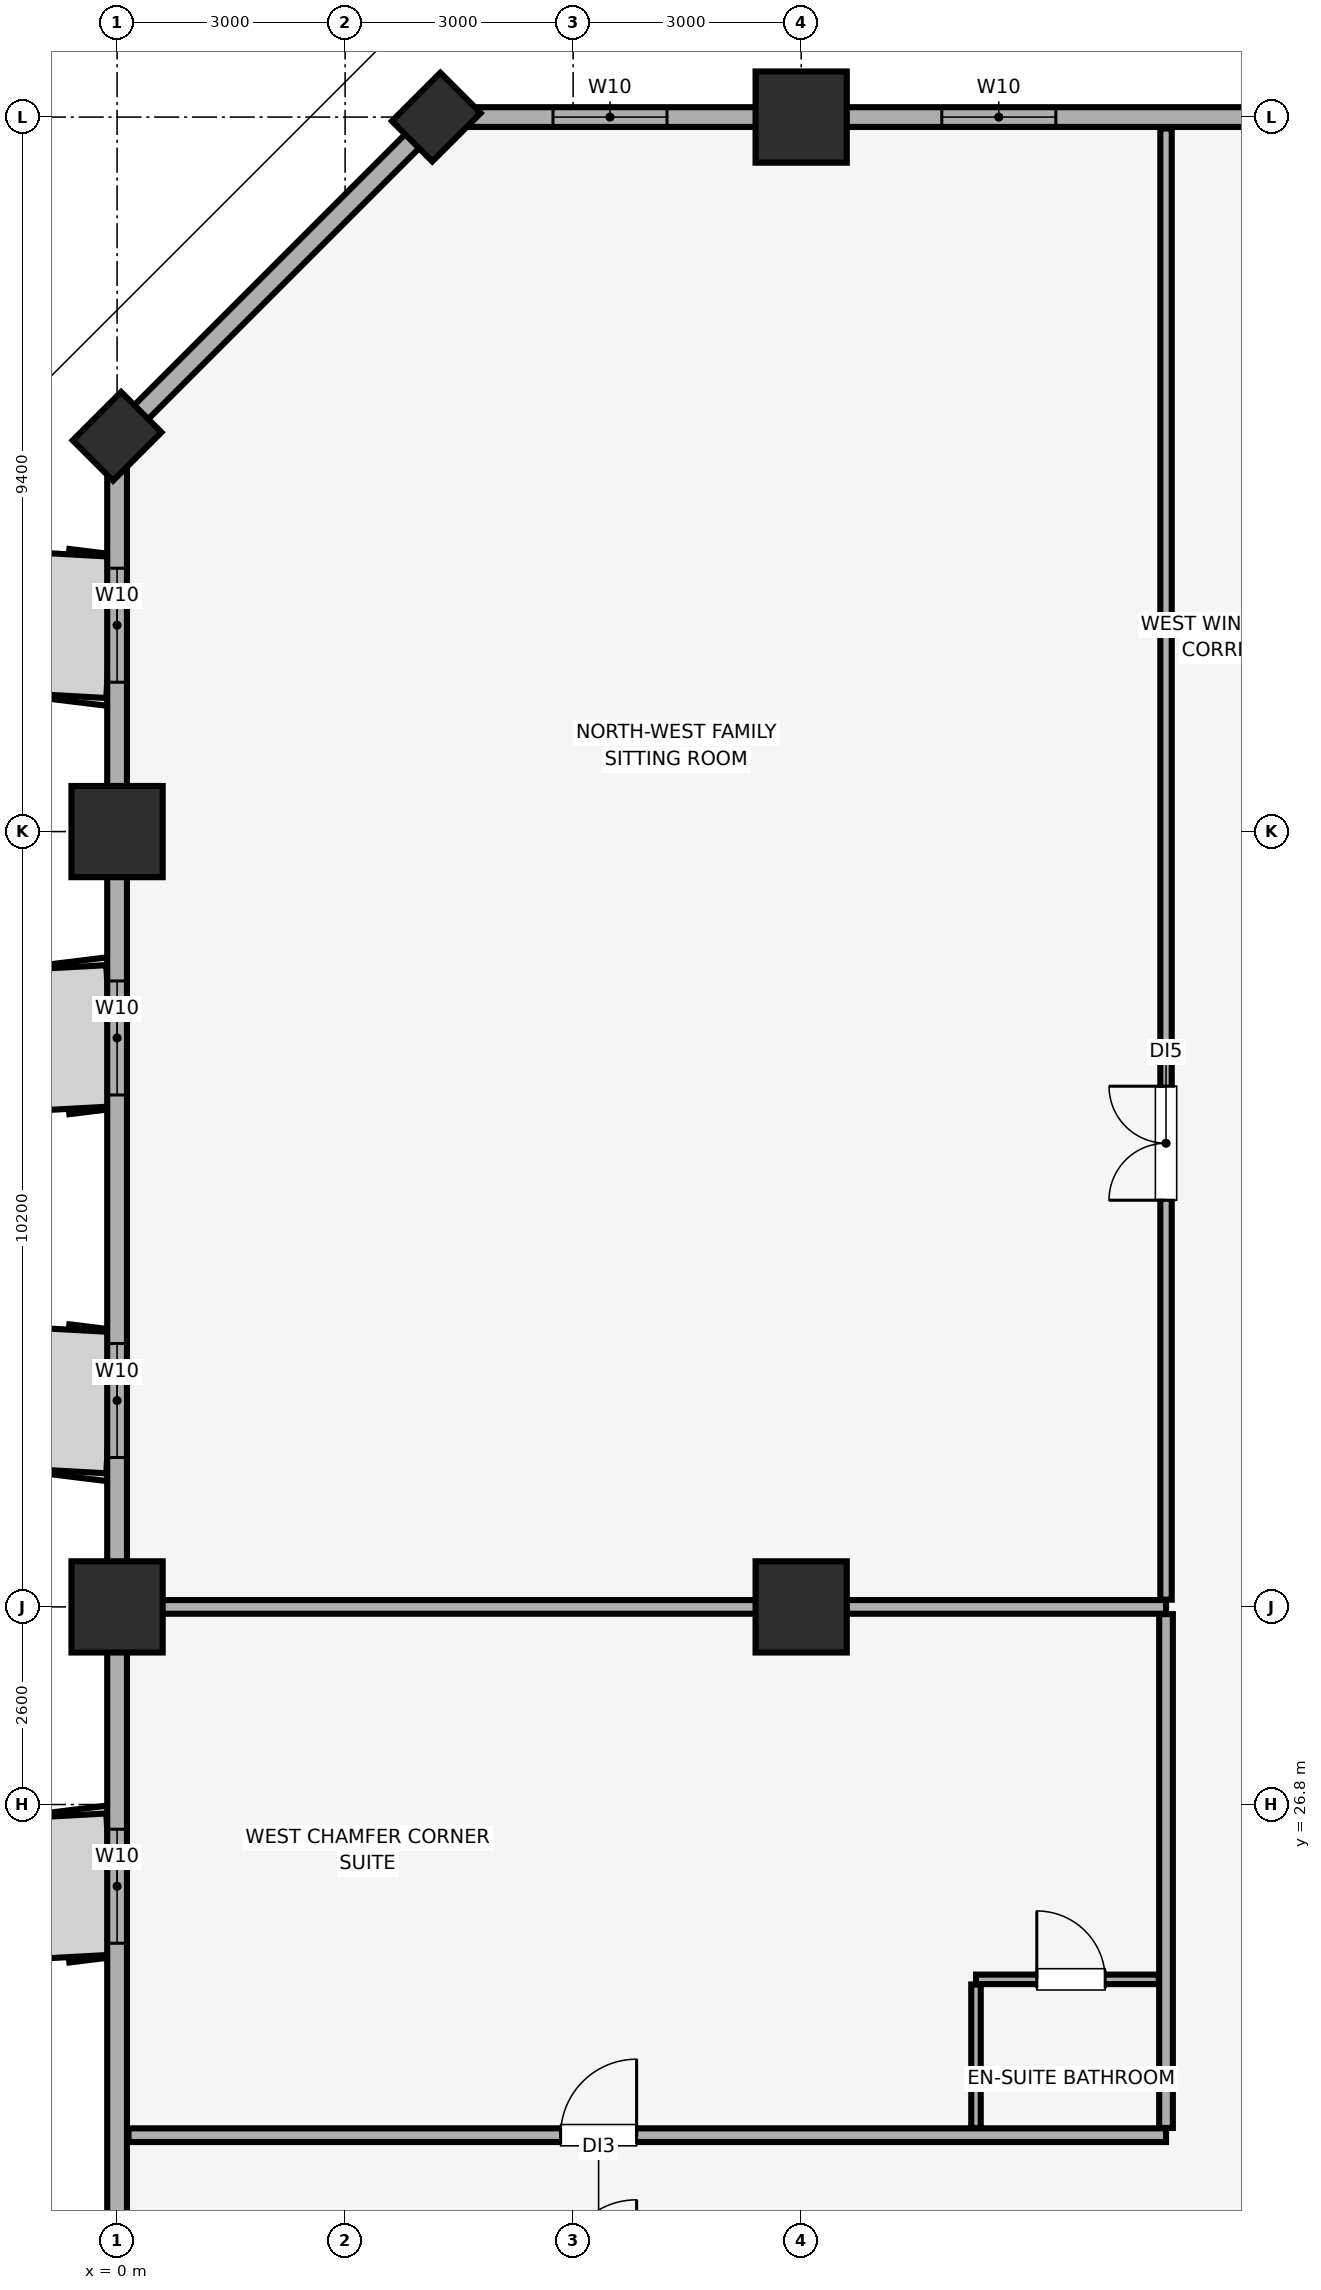
"""IFC4 building model, lengths in metres.
Left out: names, types, materials, properties, quantities, classifications, styles, units other than length and angle.
Written with IfcOpenShell. Run it as: python <this file> out.ifc"""

import sys

from ifc_helpers import new_model, si_unit, direction, frame, frame_2d, origin, origin_2d, place, context, subcontext, project, spatial, rectangle, extrude, element, fill, save


model = new_model("IFC4")
c1 = context("Model", 3, precision=1e-05, world=origin(), true_north=direction((0.0, 1.0)))
c2 = subcontext(c1, "Body", "Model", "MODEL_VIEW")
j1 = project(units=[si_unit("LENGTHUNIT", "METRE"), si_unit("PLANEANGLEUNIT", "RADIAN")], contexts=[c1])
p1 = place(None, origin())
s1 = spatial("IfcSite", under=j1, at=p1, CompositionType="ELEMENT")
p2 = place(p1, origin())
s2 = spatial("IfcBuilding", under=s1, at=p2, CompositionType="ELEMENT")
p3 = place(p2, frame((0.0, 0.0, 93.05)))
s3 = spatial("IfcBuildingStorey", under=s2, at=p3, CompositionType="ELEMENT", Elevation=93.05)
for number, where, z_axis, x_axis in (
    (1, (0.0, 29.4, 0.0), (0.0, 0.0, 1.0), (1.0, 0.0, 0.0)),
    (2, (0.0, 39.6, 0.0), (0.0, 0.0, 1.0), (1.0, 0.0, 0.0)),
):
    element("IfcColumn", number, at=place(p3, frame(where, z_axis=z_axis, x_axis=x_axis)), inside=s3, PredefinedType="COLUMN", context=c2, shape_type="SweptSolid", body=[
        extrude(rectangle(XDim=1.2, YDim=1.2, at=origin_2d()), origin(), (0.0, 0.0, 1.0), 3.51),
    ])
for number, where, z_axis, x_axis in (
    (3, (4.2, 49.0, 0.0), (0.0, 0.0, 1.0), (0.707, 0.707, 0.0)),
    (4, (0.0, 44.8, 0.0), (0.0, 0.0, 1.0), (0.707, 0.707, 0.0)),
):
    element("IfcColumn", number, at=place(p3, frame(where, z_axis=z_axis, x_axis=x_axis)), inside=s3, PredefinedType="PILASTER", context=c2, shape_type="SweptSolid", body=[
        extrude(rectangle(XDim=0.9, YDim=0.75, at=origin_2d()), origin(), (0.0, 0.0, 1.0), 3.51),
    ])
for number, where, z_axis, x_axis in (
    (5, (9.0, 29.4, 0.0), (0.0, 0.0, 1.0), (1.0, 0.0, 0.0)),
    (6, (9.0, 49.0, 0.0), (0.0, 0.0, 1.0), (1.0, 0.0, 0.0)),
):
    element("IfcColumn", number, at=place(p3, frame(where, z_axis=z_axis, x_axis=x_axis)), inside=s3, PredefinedType="COLUMN", context=c2, shape_type="SweptSolid", body=[
        extrude(rectangle(XDim=1.2, YDim=1.2, at=origin_2d()), origin(), (0.0, 0.0, 1.0), 3.51),
    ])
p4 = place(p3, frame((79.8, 49.0, 0.0), z_axis=(0.0, 0.0, 1.0), x_axis=(-1.0, 0.0, 0.0)))
e7 = element("IfcWall", 7, at=p4, inside=s3, PredefinedType="SOLIDWALL", context=c2, shape_type="SweptSolid", body=[
    extrude(rectangle(XDim=75.6, YDim=0.26, at=frame_2d((37.8, 0.0))), origin(), (0.0, 0.0, 1.0), 2.56),
])
p5 = place(p4, frame((72.565, 0.0, 0.85)))
e8 = element("IfcOpeningElement", 8, at=p5, cuts=e7, PredefinedType="OPENING", context=c2, shape_type="SweptSolid", body=[
    extrude(rectangle(XDim=1.5, YDim=1.4, at=frame_2d((0.75, 0.7))), frame((0.0, 0.14, 0.0), z_axis=(0.0, -1.0, 0.0), x_axis=(1.0, 0.0, 0.0)), (0.0, 0.0, 1.0), 0.28),
])
p6 = place(p4, frame((67.45, 0.0, 0.85)))
e9 = element("IfcOpeningElement", 9, at=p6, cuts=e7, PredefinedType="OPENING", context=c2, shape_type="SweptSolid", body=[
    extrude(rectangle(XDim=1.5, YDim=1.4, at=frame_2d((0.75, 0.7))), frame((0.0, 0.14, 0.0), z_axis=(0.0, -1.0, 0.0), x_axis=(1.0, 0.0, 0.0)), (0.0, 0.0, 1.0), 0.28),
])
p7 = place(p4, frame((7.6, 0.0, 0.85)))
e10 = element("IfcOpeningElement", 10, at=p7, cuts=e7, PredefinedType="OPENING", context=c2, shape_type="SweptSolid", body=[
    extrude(rectangle(XDim=1.5, YDim=1.4, at=frame_2d((0.75, 0.7))), frame((0.0, 0.14, 0.0), z_axis=(0.0, -1.0, 0.0), x_axis=(1.0, 0.0, 0.0)), (0.0, 0.0, 1.0), 0.28),
])
p8 = place(p4, frame((1.535, 0.0, 0.85)))
e11 = element("IfcOpeningElement", 11, at=p8, cuts=e7, PredefinedType="OPENING", context=c2, shape_type="SweptSolid", body=[
    extrude(rectangle(XDim=1.5, YDim=1.4, at=frame_2d((0.75, 0.7))), frame((0.0, 0.14, 0.0), z_axis=(0.0, -1.0, 0.0), x_axis=(1.0, 0.0, 0.0)), (0.0, 0.0, 1.0), 0.28),
])
p9 = place(p4, frame((52.265, 0.0, 0.9)))
e12 = element("IfcOpeningElement", 12, at=p9, cuts=e7, PredefinedType="OPENING", context=c2, shape_type="SweptSolid", body=[
    extrude(rectangle(XDim=1.5, YDim=1.4, at=frame_2d((0.75, 0.7))), frame((0.0, 0.14, 0.0), z_axis=(0.0, -1.0, 0.0), x_axis=(1.0, 0.0, 0.0)), (0.0, 0.0, 1.0), 0.28),
])
p10 = place(p4, frame((45.5, 0.0, 0.9)))
e13 = element("IfcOpeningElement", 13, at=p10, cuts=e7, PredefinedType="OPENING", context=c2, shape_type="SweptSolid", body=[
    extrude(rectangle(XDim=1.5, YDim=1.4, at=frame_2d((0.75, 0.7))), frame((0.0, 0.14, 0.0), z_axis=(0.0, -1.0, 0.0), x_axis=(1.0, 0.0, 0.0)), (0.0, 0.0, 1.0), 0.28),
])
p11 = place(p4, frame((31.05, 0.0, 0.9)))
e14 = element("IfcOpeningElement", 14, at=p11, cuts=e7, PredefinedType="OPENING", context=c2, shape_type="SweptSolid", body=[
    extrude(rectangle(XDim=1.5, YDim=1.4, at=frame_2d((0.75, 0.7))), frame((0.0, 0.14, 0.0), z_axis=(0.0, -1.0, 0.0), x_axis=(1.0, 0.0, 0.0)), (0.0, 0.0, 1.0), 0.28),
])
p12 = place(p4, frame((27.85, 0.0, 0.9)))
e15 = element("IfcOpeningElement", 15, at=p12, cuts=e7, PredefinedType="OPENING", context=c2, shape_type="SweptSolid", body=[
    extrude(rectangle(XDim=1.5, YDim=1.4, at=frame_2d((0.75, 0.7))), frame((0.0, 0.14, 0.0), z_axis=(0.0, -1.0, 0.0), x_axis=(1.0, 0.0, 0.0)), (0.0, 0.0, 1.0), 0.28),
])
p13 = place(p4, frame((23.485, 0.0, 0.9)))
e16 = element("IfcOpeningElement", 16, at=p13, cuts=e7, PredefinedType="OPENING", context=c2, shape_type="SweptSolid", body=[
    extrude(rectangle(XDim=1.5, YDim=1.4, at=frame_2d((0.75, 0.7))), frame((0.0, 0.14, 0.0), z_axis=(0.0, -1.0, 0.0), x_axis=(1.0, 0.0, 0.0)), (0.0, 0.0, 1.0), 0.28),
])
p14 = place(p3, frame((4.2, 49.0, 0.0), z_axis=(0.0, 0.0, 1.0), x_axis=(-0.707106781187, -0.707106781187, 0.0)))
e17 = element("IfcWall", 17, at=p14, inside=s3, PredefinedType="SOLIDWALL", context=c2, shape_type="SweptSolid", body=[
    extrude(rectangle(XDim=5.94, YDim=0.26, at=frame_2d((2.97, 0.0))), origin(), (0.0, 0.0, 1.0), 2.56),
])
p15 = place(p3, frame((0.0, 44.8, 0.0), z_axis=(0.0, 0.0, 1.0), x_axis=(0.0, -1.0, 0.0)))
e18 = element("IfcWall", 18, at=p15, inside=s3, PredefinedType="SOLIDWALL", context=c2, shape_type="SweptSolid", body=[
    extrude(rectangle(XDim=40.6, YDim=0.26, at=frame_2d((20.3, 0.0))), origin(), (0.0, 0.0, 1.0), 2.56),
])
p16 = place(p15, frame((33.05, 0.0, 0.85)))
e19 = element("IfcOpeningElement", 19, at=p16, cuts=e18, PredefinedType="OPENING", context=c2, shape_type="SweptSolid", body=[
    extrude(rectangle(XDim=1.5, YDim=1.4, at=frame_2d((0.75, 0.7))), frame((0.0, 0.14, 0.0), z_axis=(0.0, -1.0, 0.0), x_axis=(1.0, 0.0, 0.0)), (0.0, 0.0, 1.0), 0.28),
])
p17 = place(p15, frame((26.05, 0.0, 0.85)))
e20 = element("IfcOpeningElement", 20, at=p17, cuts=e18, PredefinedType="OPENING", context=c2, shape_type="SweptSolid", body=[
    extrude(rectangle(XDim=1.5, YDim=1.4, at=frame_2d((0.75, 0.7))), frame((0.0, 0.14, 0.0), z_axis=(0.0, -1.0, 0.0), x_axis=(1.0, 0.0, 0.0)), (0.0, 0.0, 1.0), 0.28),
])
p18 = place(p15, frame((18.325, 0.0, 0.85)))
e21 = element("IfcOpeningElement", 21, at=p18, cuts=e18, PredefinedType="OPENING", context=c2, shape_type="SweptSolid", body=[
    extrude(rectangle(XDim=1.5, YDim=1.4, at=frame_2d((0.75, 0.7))), frame((0.0, 0.14, 0.0), z_axis=(0.0, -1.0, 0.0), x_axis=(1.0, 0.0, 0.0)), (0.0, 0.0, 1.0), 0.28),
])
p19 = place(p15, frame((11.935, 0.0, 0.85)))
e22 = element("IfcOpeningElement", 22, at=p19, cuts=e18, PredefinedType="OPENING", context=c2, shape_type="SweptSolid", body=[
    extrude(rectangle(XDim=1.5, YDim=1.4, at=frame_2d((0.75, 0.7))), frame((0.0, 0.14, 0.0), z_axis=(0.0, -1.0, 0.0), x_axis=(1.0, 0.0, 0.0)), (0.0, 0.0, 1.0), 0.28),
])
p20 = place(p15, frame((7.165, 0.0, 0.85)))
e23 = element("IfcOpeningElement", 23, at=p20, cuts=e18, PredefinedType="OPENING", context=c2, shape_type="SweptSolid", body=[
    extrude(rectangle(XDim=1.5, YDim=1.4, at=frame_2d((0.75, 0.7))), frame((0.0, 0.14, 0.0), z_axis=(0.0, -1.0, 0.0), x_axis=(1.0, 0.0, 0.0)), (0.0, 0.0, 1.0), 0.28),
])
p21 = place(p15, frame((1.735, 0.0, 0.85)))
e24 = element("IfcOpeningElement", 24, at=p21, cuts=e18, PredefinedType="OPENING", context=c2, shape_type="SweptSolid", body=[
    extrude(rectangle(XDim=1.5, YDim=1.4, at=frame_2d((0.75, 0.7))), frame((0.0, 0.14, 0.0), z_axis=(0.0, -1.0, 0.0), x_axis=(1.0, 0.0, 0.0)), (0.0, 0.0, 1.0), 0.28),
])
p22 = place(p3, frame((0.15, 22.45, 0.0), z_axis=(0.0, 0.0, 1.0), x_axis=(1.0, 0.0, 0.0)))
e25 = element("IfcWall", 25, at=p22, inside=s3, PredefinedType="PARTITIONING", context=c2, shape_type="SweptSolid", body=[
    extrude(rectangle(XDim=13.65, YDim=0.18, at=frame_2d((6.825, 0.0))), origin(), (0.0, 0.0, 1.0), 3.51),
])
p23 = place(p22, frame((5.685, 0.0, 0.0)))
e26 = element("IfcOpeningElement", 26, at=p23, cuts=e25, PredefinedType="OPENING", context=c2, shape_type="SweptSolid", body=[
    extrude(rectangle(XDim=1.0, YDim=2.15, at=frame_2d((0.5, 1.075))), frame((0.0, 0.1, 0.0), z_axis=(0.0, -1.0, 0.0), x_axis=(1.0, 0.0, 0.0)), (0.0, 0.0, 1.0), 0.2),
])
p24 = place(p3, frame((0.15, 29.4, 0.0), z_axis=(0.0, 0.0, 1.0), x_axis=(1.0, 0.0, 0.0)))
e27 = element("IfcWall", 27, at=p24, inside=s3, PredefinedType="PARTITIONING", context=c2, shape_type="SweptSolid", body=[
    extrude(rectangle(XDim=13.65, YDim=0.18, at=frame_2d((6.825, 0.0))), origin(), (0.0, 0.0, 1.0), 2.86),
])
p25 = place(p3, frame((13.8, 22.545, 0.0), z_axis=(0.0, 0.0, 1.0), x_axis=(0.0, 1.0, 0.0)))
e28 = element("IfcWall", 28, at=p25, inside=s3, PredefinedType="PARTITIONING", context=c2, shape_type="SweptSolid", body=[
    extrude(rectangle(XDim=6.76, YDim=0.18, at=frame_2d((3.38, 0.0))), origin(), (0.0, 0.0, 1.0), 3.51),
])
p26 = place(p3, frame((11.3, 24.5, 0.0), z_axis=(0.0, 0.0, 1.0), x_axis=(1.0, 0.0, 0.0)))
e29 = element("IfcWall", 29, at=p26, inside=s3, PredefinedType="PARTITIONING", context=c2, shape_type="SweptSolid", body=[
    extrude(rectangle(XDim=2.405, YDim=0.125, at=frame_2d((1.203, 0.0))), origin(), (0.0, 0.0, 1.0), 3.51),
])
p27 = place(p26, frame((0.8, 0.0, 0.0)))
e30 = element("IfcOpeningElement", 30, at=p27, cuts=e29, PredefinedType="OPENING", context=c2, shape_type="SweptSolid", body=[
    extrude(rectangle(XDim=0.9, YDim=2.1, at=frame_2d((0.45, 1.05))), frame((0.0, 0.073, 0.0), z_axis=(0.0, -1.0, 0.0), x_axis=(1.0, 0.0, 0.0)), (0.0, 0.0, 1.0), 0.145),
])
p28 = place(p3, frame((11.3, 22.545, 0.0), z_axis=(0.0, 0.0, 1.0), x_axis=(0.0, 1.0, 0.0)))
e31 = element("IfcWall", 31, at=p28, inside=s3, PredefinedType="PARTITIONING", context=c2, shape_type="SweptSolid", body=[
    extrude(rectangle(XDim=1.888, YDim=0.125, at=frame_2d((0.944, 0.0))), origin(), (0.0, 0.0, 1.0), 3.51),
])
p29 = place(p3, frame((13.8, 29.495, 0.0), z_axis=(0.0, 0.0, 1.0), x_axis=(0.0, 1.0, 0.0)))
e32 = element("IfcWall", 32, at=p29, inside=s3, PredefinedType="PARTITIONING", context=c2, shape_type="SweptSolid", body=[
    extrude(rectangle(XDim=19.355, YDim=0.15, at=frame_2d((9.677, 0.0))), origin(), (0.0, 0.0, 1.0), 3.51),
])
p30 = place(p29, frame((5.255, 0.0, 0.0)))
e33 = element("IfcOpeningElement", 33, at=p30, cuts=e32, PredefinedType="OPENING", context=c2, shape_type="SweptSolid", body=[
    extrude(rectangle(XDim=1.5, YDim=2.25, at=frame_2d((0.75, 1.125))), frame((0.0, 0.085, 0.0), z_axis=(0.0, -1.0, 0.0), x_axis=(1.0, 0.0, 0.0)), (0.0, 0.0, 1.0), 0.17),
])
p31 = place(p18, origin())
e34 = element("IfcWindow", 34, at=p31, inside=s3, PartitioningType="SINGLE_PANEL", PredefinedType="WINDOW", context=c2, shape_type="SweptSolid", body=[
    extrude(rectangle(XDim=1.5, YDim=1.4, at=frame_2d((0.75, 0.7))), frame((0.0, 0.03, 0.0), z_axis=(0.0, -1.0, 0.0), x_axis=(1.0, 0.0, 0.0)), (0.0, 0.0, 1.0), 0.06),
])
fill(e21, e34)
p32 = place(p19, origin())
e35 = element("IfcWindow", 35, at=p32, inside=s3, PartitioningType="SINGLE_PANEL", PredefinedType="WINDOW", context=c2, shape_type="SweptSolid", body=[
    extrude(rectangle(XDim=1.5, YDim=1.4, at=frame_2d((0.75, 0.7))), frame((0.0, 0.03, 0.0), z_axis=(0.0, -1.0, 0.0), x_axis=(1.0, 0.0, 0.0)), (0.0, 0.0, 1.0), 0.06),
])
fill(e22, e35)
p33 = place(p20, origin())
e36 = element("IfcWindow", 36, at=p33, inside=s3, PartitioningType="SINGLE_PANEL", PredefinedType="WINDOW", context=c2, shape_type="SweptSolid", body=[
    extrude(rectangle(XDim=1.5, YDim=1.4, at=frame_2d((0.75, 0.7))), frame((0.0, 0.03, 0.0), z_axis=(0.0, -1.0, 0.0), x_axis=(1.0, 0.0, 0.0)), (0.0, 0.0, 1.0), 0.06),
])
fill(e23, e36)
p34 = place(p21, origin())
e37 = element("IfcWindow", 37, at=p34, inside=s3, PartitioningType="SINGLE_PANEL", PredefinedType="WINDOW", context=c2, shape_type="SweptSolid", body=[
    extrude(rectangle(XDim=1.5, YDim=1.4, at=frame_2d((0.75, 0.7))), frame((0.0, 0.03, 0.0), z_axis=(0.0, -1.0, 0.0), x_axis=(1.0, 0.0, 0.0)), (0.0, 0.0, 1.0), 0.06),
])
fill(e24, e37)
p35 = place(p5, origin())
e38 = element("IfcWindow", 38, at=p35, inside=s3, PartitioningType="SINGLE_PANEL", PredefinedType="WINDOW", context=c2, shape_type="SweptSolid", body=[
    extrude(rectangle(XDim=1.5, YDim=1.4, at=frame_2d((0.75, 0.7))), frame((0.0, 0.03, 0.0), z_axis=(0.0, -1.0, 0.0), x_axis=(1.0, 0.0, 0.0)), (0.0, 0.0, 1.0), 0.06),
])
fill(e8, e38)
p36 = place(p6, origin())
e39 = element("IfcWindow", 39, at=p36, inside=s3, PartitioningType="SINGLE_PANEL", PredefinedType="WINDOW", context=c2, shape_type="SweptSolid", body=[
    extrude(rectangle(XDim=1.5, YDim=1.4, at=frame_2d((0.75, 0.7))), frame((0.0, 0.03, 0.0), z_axis=(0.0, -1.0, 0.0), x_axis=(1.0, 0.0, 0.0)), (0.0, 0.0, 1.0), 0.06),
])
fill(e9, e39)
p37 = place(p23, origin())
e40 = element("IfcDoor", 40, at=p37, inside=s3, OperationType="SINGLE_SWING_RIGHT", PredefinedType="DOOR", context=c2, shape_type="SweptSolid", body=[
    extrude(rectangle(XDim=1.0, YDim=2.15, at=frame_2d((0.5, 1.075))), frame((0.0, 0.025, 0.0), z_axis=(0.0, -1.0, 0.0), x_axis=(1.0, 0.0, 0.0)), (0.0, 0.0, 1.0), 0.05),
])
fill(e26, e40)
p38 = place(p27, origin())
e41 = element("IfcDoor", 41, at=p38, inside=s3, OperationType="SINGLE_SWING_LEFT", PredefinedType="DOOR", context=c2, shape_type="SweptSolid", body=[
    extrude(rectangle(XDim=0.9, YDim=2.1, at=frame_2d((0.45, 1.05))), frame((0.0, 0.025, 0.0), z_axis=(0.0, -1.0, 0.0), x_axis=(1.0, 0.0, 0.0)), (0.0, 0.0, 1.0), 0.05),
])
fill(e30, e41)
p39 = place(p30, origin())
e42 = element("IfcDoor", 42, at=p39, inside=s3, OperationType="DOUBLE_DOOR_SINGLE_SWING", PredefinedType="DOOR", context=c2, shape_type="SweptSolid", body=[
    extrude(rectangle(XDim=1.5, YDim=2.25, at=frame_2d((0.75, 1.125))), frame((0.0, 0.025, 0.0), z_axis=(0.0, -1.0, 0.0), x_axis=(1.0, 0.0, 0.0)), (0.0, 0.0, 1.0), 0.05),
])
fill(e33, e42)
save(model, sys.argv[1])
